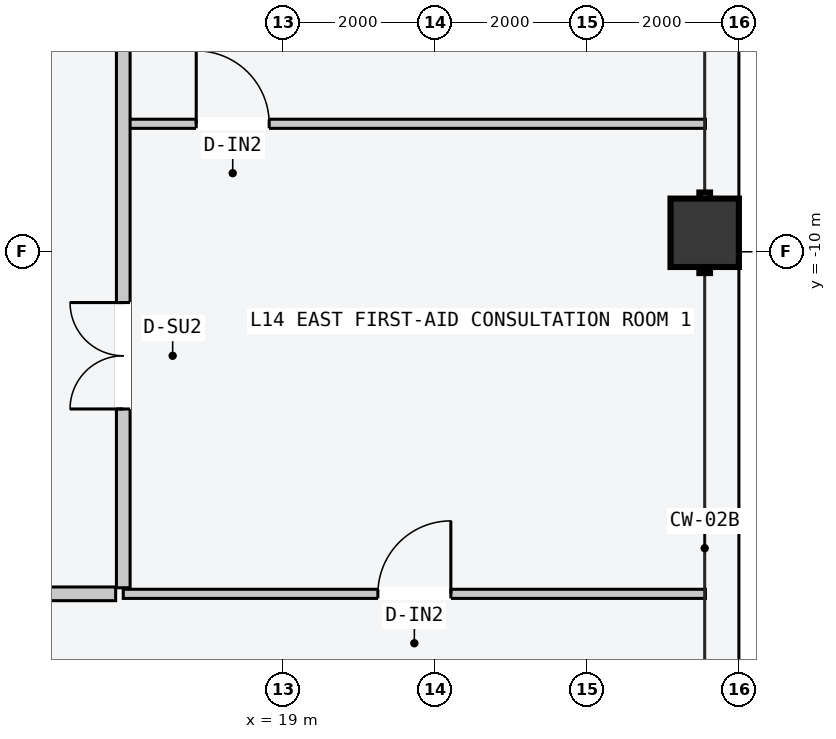
"""IFC4 building model, lengths in metres.
Left out: names, types, materials, properties, quantities, classifications, styles, units other than length and angle.
Written with IfcOpenShell. Run it as: python <this file> out.ifc"""

import sys

from ifc_helpers import new_model, si_unit, direction, frame, frame_2d, origin, origin_2d, place, context, subcontext, project, spatial, rectangle, hollow_rectangle, extrude, element, fill, save


model = new_model("IFC4")
c1 = context("Model", 3, precision=1e-05, world=origin(), true_north=direction((0.0, 1.0)))
c2 = subcontext(c1, "Body", "Model", "MODEL_VIEW")
j1 = project(units=[si_unit("LENGTHUNIT", "METRE"), si_unit("PLANEANGLEUNIT", "RADIAN")], contexts=[c1])
p1 = place(None, origin())
s1 = spatial("IfcSite", under=j1, at=p1, CompositionType="ELEMENT")
p2 = place(p1, origin())
s2 = spatial("IfcBuilding", under=s1, at=p2, CompositionType="ELEMENT")
p3 = place(p2, frame((0.0, 0.0, 56.4)))
s3 = spatial("IfcBuildingStorey", under=s2, at=p3, CompositionType="ELEMENT", Elevation=56.4)
p4 = place(p3, frame((24.55, -9.75, 0.0), z_axis=(0.0, 0.0, 1.0), x_axis=(0.0, 1.0, 0.0)))
e1 = element("IfcColumn", 1, at=p4, inside=s3, PredefinedType="COLUMN", context=c2, shape_type="SweptSolid", body=[
    extrude(hollow_rectangle(XDim=0.9, YDim=0.9, WallThickness=0.045, at=origin_2d()), origin(), (0.0, 0.0, 1.0), 3.6),
])
p5 = place(p3, frame((-16.8, -14.5, 0.0), z_axis=(0.0, 0.0, 1.0), x_axis=(1.0, 0.0, 0.0)))
e2 = element("IfcWall", 2, at=p5, inside=s3, PredefinedType="PARTITIONING", context=c2, shape_type="SweptSolid", body=[
    extrude(rectangle(XDim=33.6, YDim=0.18, at=frame_2d((16.8, 0.0))), origin(), (0.0, 0.0, 1.0), 3.4),
])
p6 = place(p5, frame((4.137, 0.0, 0.0)))
e3 = element("IfcOpeningElement", 3, at=p6, cuts=e2, PredefinedType="OPENING", context=c2, shape_type="SweptSolid", body=[
    extrude(rectangle(XDim=0.96, YDim=2.18, at=frame_2d((0.48, 1.09))), frame((0.0, 0.1, 0.0), z_axis=(0.0, -1.0, 0.0), x_axis=(1.0, 0.0, 0.0)), (0.0, 0.0, 1.0), 0.2),
])
p7 = place(p5, frame((13.901, 0.0, 0.0)))
e4 = element("IfcOpeningElement", 4, at=p7, cuts=e2, PredefinedType="OPENING", context=c2, shape_type="SweptSolid", body=[
    extrude(rectangle(XDim=1.02, YDim=2.2, at=frame_2d((0.51, 1.1))), frame((0.0, 0.1, 0.0), z_axis=(0.0, -1.0, 0.0), x_axis=(1.0, 0.0, 0.0)), (0.0, 0.0, 1.0), 0.2),
])
p8 = place(p5, frame((23.637, 0.0, 0.0)))
e5 = element("IfcOpeningElement", 5, at=p8, cuts=e2, PredefinedType="OPENING", context=c2, shape_type="SweptSolid", body=[
    extrude(rectangle(XDim=1.06, YDim=2.2, at=frame_2d((0.53, 1.1))), frame((0.0, 0.1, 0.0), z_axis=(0.0, -1.0, 0.0), x_axis=(1.0, 0.0, 0.0)), (0.0, 0.0, 1.0), 0.2),
])
p9 = place(p5, frame((30.553, 0.0, 0.0)))
e6 = element("IfcOpeningElement", 6, at=p9, cuts=e2, PredefinedType="OPENING", context=c2, shape_type="SweptSolid", body=[
    extrude(rectangle(XDim=1.24, YDim=2.24, at=frame_2d((0.62, 1.12))), frame((0.0, 0.1, 0.0), z_axis=(0.0, -1.0, 0.0), x_axis=(1.0, 0.0, 0.0)), (0.0, 0.0, 1.0), 0.2),
])
p10 = place(p3, frame((16.9, -14.5, 0.0), z_axis=(0.0, 0.0, 1.0), x_axis=(1.0, 0.0, 0.0)))
e7 = element("IfcWall", 7, at=p10, inside=s3, PredefinedType="PARTITIONING", context=c2, shape_type="SweptSolid", body=[
    extrude(rectangle(XDim=7.66, YDim=0.12, at=frame_2d((3.83, 0.0))), origin(), (0.0, 0.0, 1.0), 3.4),
])
p11 = place(p10, frame((3.35, 0.0, 0.0)))
e8 = element("IfcOpeningElement", 8, at=p11, cuts=e7, PredefinedType="OPENING", context=c2, shape_type="SweptSolid", body=[
    extrude(rectangle(XDim=0.96, YDim=2.18, at=frame_2d((0.48, 1.09))), frame((0.0, 0.07, 0.0), z_axis=(0.0, -1.0, 0.0), x_axis=(1.0, 0.0, 0.0)), (0.0, 0.0, 1.0), 0.14),
])
p12 = place(p3, frame((16.96, -8.316, 0.0), z_axis=(0.0, 0.0, 1.0), x_axis=(1.0, 0.0, 0.0)))
e9 = element("IfcWall", 9, at=p12, inside=s3, PredefinedType="PARTITIONING", context=c2, shape_type="SweptSolid", body=[
    extrude(rectangle(XDim=7.6, YDim=0.12, at=frame_2d((3.8, 0.0))), origin(), (0.0, 0.0, 1.0), 3.4),
])
p13 = place(p12, frame((0.9, 0.0, 0.0)))
e10 = element("IfcOpeningElement", 10, at=p13, cuts=e9, PredefinedType="OPENING", context=c2, shape_type="SweptSolid", body=[
    extrude(rectangle(XDim=0.96, YDim=2.18, at=frame_2d((0.48, 1.09))), frame((0.0, 0.07, 0.0), z_axis=(0.0, -1.0, 0.0), x_axis=(1.0, 0.0, 0.0)), (0.0, 0.0, 1.0), 0.14),
])
p14 = place(p3, frame((16.9, -14.42, 0.0), z_axis=(0.0, 0.0, 1.0), x_axis=(0.0, 1.0, 0.0)))
e11 = element("IfcWall", 11, at=p14, inside=s3, PredefinedType="PARTITIONING", context=c2, shape_type="SweptSolid", body=[
    extrude(rectangle(XDim=26.54, YDim=0.18, at=frame_2d((13.27, 0.0))), origin(), (0.0, 0.0, 1.0), 3.4),
])
p15 = place(p14, frame((2.352, 0.0, 0.0)))
e12 = element("IfcOpeningElement", 12, at=p15, cuts=e11, PredefinedType="OPENING", context=c2, shape_type="SweptSolid", body=[
    extrude(rectangle(XDim=1.4, YDim=2.2, at=frame_2d((0.7, 1.1))), frame((0.0, 0.1, 0.0), z_axis=(0.0, -1.0, 0.0), x_axis=(1.0, 0.0, 0.0)), (0.0, 0.0, 1.0), 0.2),
])
p16 = place(p14, frame((10.166, 0.0, 0.0)))
e13 = element("IfcOpeningElement", 13, at=p16, cuts=e11, PredefinedType="OPENING", context=c2, shape_type="SweptSolid", body=[
    extrude(rectangle(XDim=0.9, YDim=2.15, at=frame_2d((0.45, 1.075))), frame((0.0, 0.1, 0.0), z_axis=(0.0, -1.0, 0.0), x_axis=(1.0, 0.0, 0.0)), (0.0, 0.0, 1.0), 0.2),
])
p17 = place(p14, frame((20.354, 0.0, 0.0)))
e14 = element("IfcOpeningElement", 14, at=p17, cuts=e11, PredefinedType="OPENING", context=c2, shape_type="SweptSolid", body=[
    extrude(rectangle(XDim=0.96, YDim=2.18, at=frame_2d((0.48, 1.09))), frame((0.0, 0.1, 0.0), z_axis=(0.0, -1.0, 0.0), x_axis=(1.0, 0.0, 0.0)), (0.0, 0.0, 1.0), 0.2),
])
p18 = place(p11, origin())
e15 = element("IfcDoor", 15, at=p18, inside=s3, OperationType="SINGLE_SWING_RIGHT", PredefinedType="DOOR", context=c2, shape_type="SweptSolid", body=[
    extrude(rectangle(XDim=0.96, YDim=2.18, at=frame_2d((0.48, 1.09))), frame((0.0, 0.025, 0.0), z_axis=(0.0, -1.0, 0.0), x_axis=(1.0, 0.0, 0.0)), (0.0, 0.0, 1.0), 0.05),
])
fill(e8, e15)
p19 = place(p13, origin())
e16 = element("IfcDoor", 16, at=p19, inside=s3, OperationType="SINGLE_SWING_LEFT", PredefinedType="DOOR", context=c2, shape_type="SweptSolid", body=[
    extrude(rectangle(XDim=0.96, YDim=2.18, at=frame_2d((0.48, 1.09))), frame((0.0, 0.025, 0.0), z_axis=(0.0, -1.0, 0.0), x_axis=(1.0, 0.0, 0.0)), (0.0, 0.0, 1.0), 0.05),
])
fill(e10, e16)
p20 = place(p15, origin())
e17 = element("IfcDoor", 17, at=p20, inside=s3, OperationType="DOUBLE_DOOR_SINGLE_SWING", PredefinedType="DOOR", context=c2, shape_type="SweptSolid", body=[
    extrude(rectangle(XDim=1.4, YDim=2.2, at=frame_2d((0.7, 1.1))), frame((0.0, 0.025, 0.0), z_axis=(0.0, -1.0, 0.0), x_axis=(1.0, 0.0, 0.0)), (0.0, 0.0, 1.0), 0.05),
])
fill(e12, e17)
save(model, sys.argv[1])
